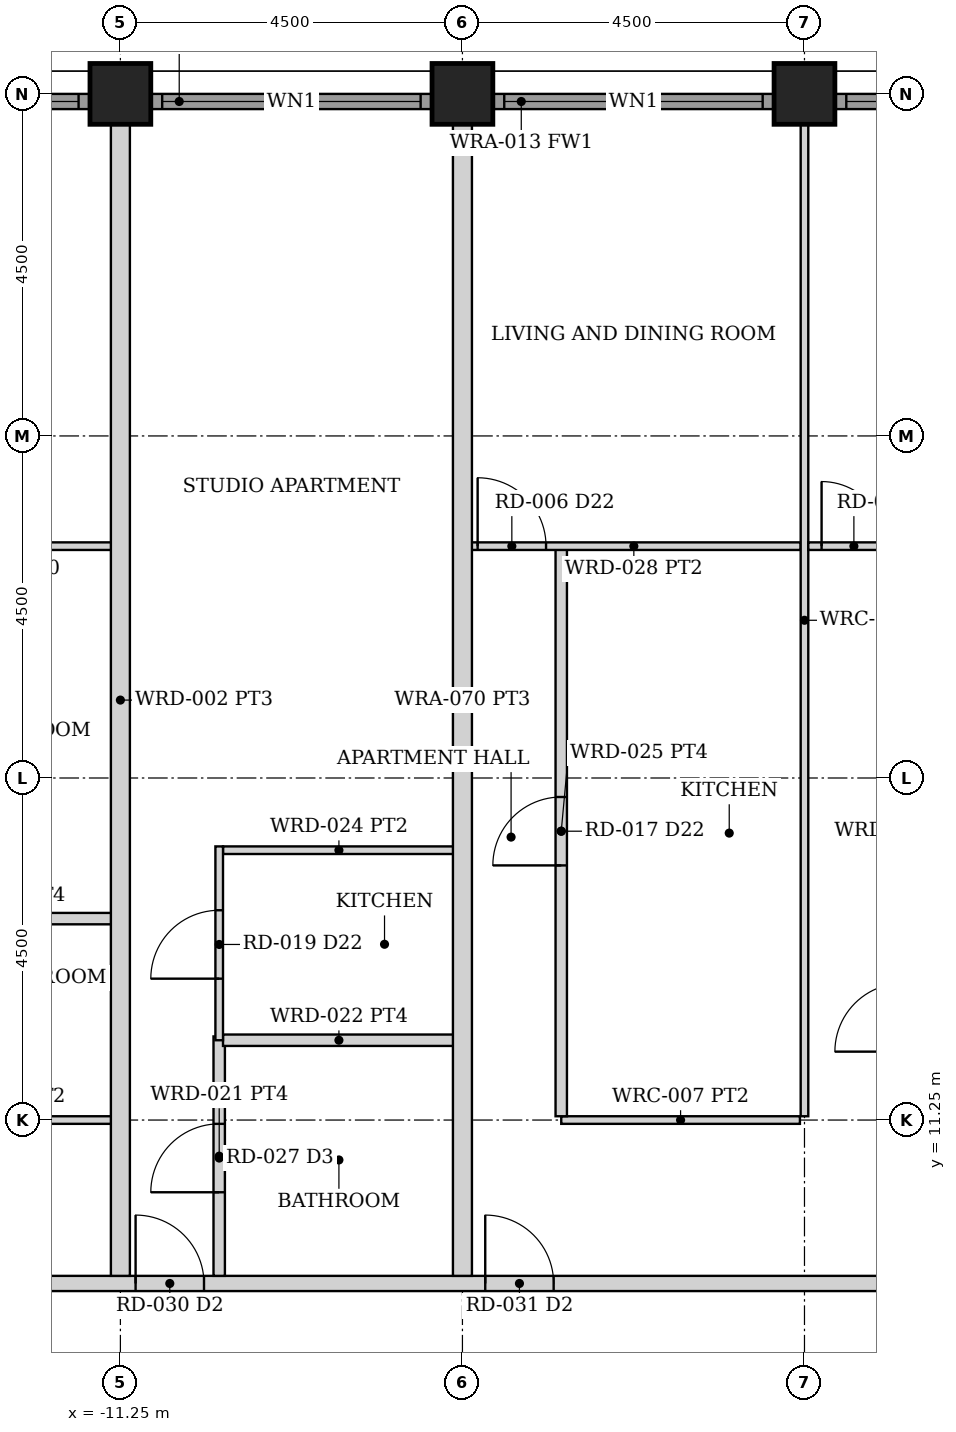
"""IFC4 building model, lengths in metres.
Left out: names, types, materials, properties, quantities, classifications, styles, units other than length and angle.
Written with IfcOpenShell. Run it as: python <this file> out.ifc"""

import sys

from ifc_helpers import new_model, si_unit, direction, frame, frame_2d, origin, origin_2d, place, context, subcontext, project, spatial, rectangle, hollow_rectangle, extrude, element, fill, save


model = new_model("IFC4")
c1 = context("Model", 3, precision=1e-05, world=origin(), true_north=direction((0.0, 1.0)))
c2 = subcontext(c1, "Body", "Model", "MODEL_VIEW")
j1 = project(units=[si_unit("LENGTHUNIT", "METRE"), si_unit("PLANEANGLEUNIT", "RADIAN")], contexts=[c1])
p1 = place(None, origin())
s1 = spatial("IfcSite", under=j1, at=p1, CompositionType="ELEMENT")
p2 = place(p1, origin())
s2 = spatial("IfcBuilding", under=s1, at=p2, CompositionType="ELEMENT")
p3 = place(p2, frame((0.0, 0.0, 58.0)))
s3 = spatial("IfcBuildingStorey", under=s2, at=p3, CompositionType="ELEMENT", Elevation=58.0)
for number, where, z_axis, x_axis in (
    (1, (-11.25, 24.75, 0.0), (0.0, 0.0, 1.0), (0.0, 1.0, 0.0)),
    (2, (-6.75, 24.75, 0.0), (0.0, 0.0, 1.0), (0.0, 1.0, 0.0)),
    (3, (-2.25, 24.75, 0.0), (0.0, 0.0, 1.0), (0.0, 1.0, 0.0)),
):
    element("IfcColumn", number, at=place(p3, frame(where, z_axis=z_axis, x_axis=x_axis)), inside=s3, PredefinedType="COLUMN", context=c2, shape_type="SweptSolid", body=[
        extrude(hollow_rectangle(XDim=0.8, YDim=0.8, WallThickness=0.06, at=origin_2d()), origin(), (0.0, 0.0, 1.0), 3.5),
    ])
p4 = place(p3, frame((-15.345, 24.65, 0.0), z_axis=(0.0, 0.0, 1.0), x_axis=(1.0, 0.0, 0.0)))
e4 = element("IfcWall", 4, at=p4, inside=s3, PredefinedType="SOLIDWALL", context=c2, shape_type="SweptSolid", body=[
    extrude(rectangle(XDim=3.69, YDim=0.2, at=frame_2d((1.845, 0.0))), origin(), (0.0, 0.0, 1.0), 2.379),
])
p5 = place(p4, frame((0.145, 0.0, 0.3)))
e5 = element("IfcOpeningElement", 5, at=p5, cuts=e4, PredefinedType="OPENING", context=c2, shape_type="SweptSolid", body=[
    extrude(rectangle(XDim=3.4, YDim=1.929, at=frame_2d((1.7, 0.964))), frame((0.0, 0.11, 0.0), z_axis=(0.0, -1.0, 0.0), x_axis=(1.0, 0.0, 0.0)), (0.0, 0.0, 1.0), 0.22),
])
p6 = place(p3, frame((-10.845, 24.65, 0.0), z_axis=(0.0, 0.0, 1.0), x_axis=(1.0, 0.0, 0.0)))
e6 = element("IfcWall", 6, at=p6, inside=s3, PredefinedType="SOLIDWALL", context=c2, shape_type="SweptSolid", body=[
    extrude(rectangle(XDim=3.69, YDim=0.2, at=frame_2d((1.845, 0.0))), origin(), (0.0, 0.0, 1.0), 2.379),
])
p7 = place(p6, frame((0.145, 0.0, 0.3)))
e7 = element("IfcOpeningElement", 7, at=p7, cuts=e6, PredefinedType="OPENING", context=c2, shape_type="SweptSolid", body=[
    extrude(rectangle(XDim=3.4, YDim=1.929, at=frame_2d((1.7, 0.964))), frame((0.0, 0.11, 0.0), z_axis=(0.0, -1.0, 0.0), x_axis=(1.0, 0.0, 0.0)), (0.0, 0.0, 1.0), 0.22),
])
p8 = place(p3, frame((-6.345, 24.65, 0.0), z_axis=(0.0, 0.0, 1.0), x_axis=(1.0, 0.0, 0.0)))
e8 = element("IfcWall", 8, at=p8, inside=s3, PredefinedType="SOLIDWALL", context=c2, shape_type="SweptSolid", body=[
    extrude(rectangle(XDim=3.69, YDim=0.2, at=frame_2d((1.845, 0.0))), origin(), (0.0, 0.0, 1.0), 2.379),
])
p9 = place(p8, frame((0.145, 0.0, 0.3)))
e9 = element("IfcOpeningElement", 9, at=p9, cuts=e8, PredefinedType="OPENING", context=c2, shape_type="SweptSolid", body=[
    extrude(rectangle(XDim=3.4, YDim=1.929, at=frame_2d((1.7, 0.964))), frame((0.0, 0.11, 0.0), z_axis=(0.0, -1.0, 0.0), x_axis=(1.0, 0.0, 0.0)), (0.0, 0.0, 1.0), 0.22),
])
p10 = place(p3, frame((-1.845, 24.65, 0.0), z_axis=(0.0, 0.0, 1.0), x_axis=(1.0, 0.0, 0.0)))
e10 = element("IfcWall", 10, at=p10, inside=s3, PredefinedType="SOLIDWALL", context=c2, shape_type="SweptSolid", body=[
    extrude(rectangle(XDim=3.69, YDim=0.2, at=frame_2d((1.845, 0.0))), origin(), (0.0, 0.0, 1.0), 2.379),
])
p11 = place(p10, frame((0.145, 0.0, 0.3)))
e11 = element("IfcOpeningElement", 11, at=p11, cuts=e10, PredefinedType="OPENING", context=c2, shape_type="SweptSolid", body=[
    extrude(rectangle(XDim=3.4, YDim=1.929, at=frame_2d((1.7, 0.964))), frame((0.0, 0.11, 0.0), z_axis=(0.0, -1.0, 0.0), x_axis=(1.0, 0.0, 0.0)), (0.0, 0.0, 1.0), 0.22),
])
p12 = place(p3, frame((-24.55, 9.1, 0.0), z_axis=(0.0, 0.0, 1.0), x_axis=(1.0, 0.0, 0.0)))
e12 = element("IfcWall", 12, at=p12, inside=s3, PredefinedType="PARTITIONING", context=c2, shape_type="SweptSolid", body=[
    extrude(rectangle(XDim=49.1, YDim=0.2, at=frame_2d((24.55, 0.0))), origin(), (0.0, 0.0, 1.0), 2.373),
])
p13 = place(p12, frame((5.1, 0.0, 0.0)))
e13 = element("IfcOpeningElement", 13, at=p13, cuts=e12, PredefinedType="OPENING", context=c2, shape_type="SweptSolid", body=[
    extrude(rectangle(XDim=0.9, YDim=2.1, at=frame_2d((0.45, 1.05))), frame((0.0, 0.11, 0.0), z_axis=(0.0, -1.0, 0.0), x_axis=(1.0, 0.0, 0.0)), (0.0, 0.0, 1.0), 0.22),
])
p14 = place(p12, frame((13.5, 0.0, 0.0)))
e14 = element("IfcOpeningElement", 14, at=p14, cuts=e12, PredefinedType="OPENING", context=c2, shape_type="SweptSolid", body=[
    extrude(rectangle(XDim=0.9, YDim=2.1, at=frame_2d((0.45, 1.05))), frame((0.0, 0.11, 0.0), z_axis=(0.0, -1.0, 0.0), x_axis=(1.0, 0.0, 0.0)), (0.0, 0.0, 1.0), 0.22),
])
p15 = place(p12, frame((18.1, 0.0, 0.0)))
e15 = element("IfcOpeningElement", 15, at=p15, cuts=e12, PredefinedType="OPENING", context=c2, shape_type="SweptSolid", body=[
    extrude(rectangle(XDim=0.9, YDim=2.1, at=frame_2d((0.45, 1.05))), frame((0.0, 0.11, 0.0), z_axis=(0.0, -1.0, 0.0), x_axis=(1.0, 0.0, 0.0)), (0.0, 0.0, 1.0), 0.22),
])
p16 = place(p12, frame((31.5, 0.0, 0.0)))
e16 = element("IfcOpeningElement", 16, at=p16, cuts=e12, PredefinedType="OPENING", context=c2, shape_type="SweptSolid", body=[
    extrude(rectangle(XDim=0.9, YDim=2.1, at=frame_2d((0.45, 1.05))), frame((0.0, 0.11, 0.0), z_axis=(0.0, -1.0, 0.0), x_axis=(1.0, 0.0, 0.0)), (0.0, 0.0, 1.0), 0.22),
])
p17 = place(p12, frame((43.1, 0.0, 0.0)))
e17 = element("IfcOpeningElement", 17, at=p17, cuts=e12, PredefinedType="OPENING", context=c2, shape_type="SweptSolid", body=[
    extrude(rectangle(XDim=0.9, YDim=2.1, at=frame_2d((0.45, 1.05))), frame((0.0, 0.11, 0.0), z_axis=(0.0, -1.0, 0.0), x_axis=(1.0, 0.0, 0.0)), (0.0, 0.0, 1.0), 0.22),
])
p18 = place(p3, frame((-14.45, 11.25, 0.0), z_axis=(0.0, 0.0, 1.0), x_axis=(1.0, 0.0, 0.0)))
e18 = element("IfcWall", 18, at=p18, inside=s3, PredefinedType="PARTITIONING", context=c2, shape_type="SweptSolid", body=[
    extrude(rectangle(XDim=3.14, YDim=0.1, at=frame_2d((1.57, 0.0))), origin(), (0.0, 0.0, 1.0), 2.373),
])
p19 = place(p3, frame((-15.7, 18.8, 0.0), z_axis=(0.0, 0.0, 1.0), x_axis=(1.0, 0.0, 0.0)))
e19 = element("IfcWall", 19, at=p19, inside=s3, PredefinedType="PARTITIONING", context=c2, shape_type="SweptSolid", body=[
    extrude(rectangle(XDim=4.39, YDim=0.1, at=frame_2d((2.195, 0.0))), origin(), (0.0, 0.0, 1.0), 2.373),
])
p20 = place(p19, frame((0.175, 0.0, 0.0)))
e20 = element("IfcOpeningElement", 20, at=p20, cuts=e19, PredefinedType="OPENING", context=c2, shape_type="SweptSolid", body=[
    extrude(rectangle(XDim=0.85, YDim=2.1, at=frame_2d((0.425, 1.05))), frame((0.0, 0.06, 0.0), z_axis=(0.0, -1.0, 0.0), x_axis=(1.0, 0.0, 0.0)), (0.0, 0.0, 1.0), 0.12),
])
p21 = place(p19, frame((2.46, 0.0, 0.0)))
e21 = element("IfcOpeningElement", 21, at=p21, cuts=e19, PredefinedType="OPENING", context=c2, shape_type="SweptSolid", body=[
    extrude(rectangle(XDim=0.8, YDim=2.1, at=frame_2d((0.4, 1.05))), frame((0.0, 0.06, 0.0), z_axis=(0.0, -1.0, 0.0), x_axis=(1.0, 0.0, 0.0)), (0.0, 0.0, 1.0), 0.12),
])
p22 = place(p3, frame((-14.45, 13.9, 0.0), z_axis=(0.0, 0.0, 1.0), x_axis=(1.0, 0.0, 0.0)))
e22 = element("IfcWall", 22, at=p22, inside=s3, PredefinedType="PARTITIONING", context=c2, shape_type="SweptSolid", body=[
    extrude(rectangle(XDim=3.14, YDim=0.15, at=frame_2d((1.57, 0.0))), origin(), (0.0, 0.0, 1.0), 2.373),
])
p23 = place(p3, frame((-9.95, 9.2, 0.0), z_axis=(0.0, 0.0, 1.0), x_axis=(0.0, 1.0, 0.0)))
e23 = element("IfcWall", 23, at=p23, inside=s3, PredefinedType="PARTITIONING", context=c2, shape_type="SweptSolid", body=[
    extrude(rectangle(XDim=3.15, YDim=0.15, at=frame_2d((1.575, 0.0))), origin(), (0.0, 0.0, 1.0), 2.373),
])
p24 = place(p23, frame((1.1, 0.0, 0.0)))
e24 = element("IfcOpeningElement", 24, at=p24, cuts=e23, PredefinedType="OPENING", context=c2, shape_type="SweptSolid", body=[
    extrude(rectangle(XDim=0.9, YDim=2.1, at=frame_2d((0.45, 1.05))), frame((0.0, 0.085, 0.0), z_axis=(0.0, -1.0, 0.0), x_axis=(1.0, 0.0, 0.0)), (0.0, 0.0, 1.0), 0.17),
])
p25 = place(p3, frame((-9.9, 12.3, 0.0), z_axis=(0.0, 0.0, 1.0), x_axis=(1.0, 0.0, 0.0)))
e25 = element("IfcWall", 25, at=p25, inside=s3, PredefinedType="PARTITIONING", context=c2, shape_type="SweptSolid", body=[
    extrude(rectangle(XDim=3.05, YDim=0.15, at=frame_2d((1.525, 0.0))), origin(), (0.0, 0.0, 1.0), 2.373),
])
p26 = place(p3, frame((-9.9, 14.8, 0.0), z_axis=(0.0, 0.0, 1.0), x_axis=(1.0, 0.0, 0.0)))
e26 = element("IfcWall", 26, at=p26, inside=s3, PredefinedType="PARTITIONING", context=c2, shape_type="SweptSolid", body=[
    extrude(rectangle(XDim=3.05, YDim=0.1, at=frame_2d((1.525, 0.0))), origin(), (0.0, 0.0, 1.0), 2.373),
])
p27 = place(p3, frame((-9.95, 12.3, 0.0), z_axis=(0.0, 0.0, 1.0), x_axis=(0.0, 1.0, 0.0)))
e27 = element("IfcWall", 27, at=p27, inside=s3, PredefinedType="PARTITIONING", context=c2, shape_type="SweptSolid", body=[
    extrude(rectangle(XDim=2.55, YDim=0.1, at=frame_2d((1.275, 0.0))), origin(), (0.0, 0.0, 1.0), 2.373),
])
p28 = place(p27, frame((0.81, 0.0, 0.0)))
e28 = element("IfcOpeningElement", 28, at=p28, cuts=e27, PredefinedType="OPENING", context=c2, shape_type="SweptSolid", body=[
    extrude(rectangle(XDim=0.9, YDim=2.1, at=frame_2d((0.45, 1.05))), frame((0.0, 0.06, 0.0), z_axis=(0.0, -1.0, 0.0), x_axis=(1.0, 0.0, 0.0)), (0.0, 0.0, 1.0), 0.12),
])
p29 = place(p3, frame((-5.45, 11.25, 0.0), z_axis=(0.0, 0.0, 1.0), x_axis=(1.0, 0.0, 0.0)))
e29 = element("IfcWall", 29, at=p29, inside=s3, PredefinedType="PARTITIONING", context=c2, shape_type="SweptSolid", body=[
    extrude(rectangle(XDim=3.14, YDim=0.1, at=frame_2d((1.57, 0.0))), origin(), (0.0, 0.0, 1.0), 2.373),
])
p30 = place(p3, frame((-5.45, 11.3, 0.0), z_axis=(0.0, 0.0, 1.0), x_axis=(0.0, 1.0, 0.0)))
e30 = element("IfcWall", 30, at=p30, inside=s3, PredefinedType="PARTITIONING", context=c2, shape_type="SweptSolid", body=[
    extrude(rectangle(XDim=7.5, YDim=0.15, at=frame_2d((3.75, 0.0))), origin(), (0.0, 0.0, 1.0), 2.373),
])
p31 = place(p30, frame((3.3, 0.0, 0.0)))
e31 = element("IfcOpeningElement", 31, at=p31, cuts=e30, PredefinedType="OPENING", context=c2, shape_type="SweptSolid", body=[
    extrude(rectangle(XDim=0.9, YDim=2.1, at=frame_2d((0.45, 1.05))), frame((0.0, 0.085, 0.0), z_axis=(0.0, -1.0, 0.0), x_axis=(1.0, 0.0, 0.0)), (0.0, 0.0, 1.0), 0.17),
])
p32 = place(p3, frame((-6.69, 18.8, 0.0), z_axis=(0.0, 0.0, 1.0), x_axis=(1.0, 0.0, 0.0)))
e32 = element("IfcWall", 32, at=p32, inside=s3, PredefinedType="PARTITIONING", context=c2, shape_type="SweptSolid", body=[
    extrude(rectangle(XDim=4.39, YDim=0.1, at=frame_2d((2.195, 0.0))), origin(), (0.0, 0.0, 1.0), 2.373),
])
p33 = place(p32, frame((0.14, 0.0, 0.0)))
e33 = element("IfcOpeningElement", 33, at=p33, cuts=e32, PredefinedType="OPENING", context=c2, shape_type="SweptSolid", body=[
    extrude(rectangle(XDim=0.9, YDim=2.1, at=frame_2d((0.45, 1.05))), frame((0.0, 0.06, 0.0), z_axis=(0.0, -1.0, 0.0), x_axis=(1.0, 0.0, 0.0)), (0.0, 0.0, 1.0), 0.12),
])
p34 = place(p3, frame((-2.25, 11.3, 0.0), z_axis=(0.0, 0.0, 1.0), x_axis=(0.0, 1.0, 0.0)))
e34 = element("IfcWall", 34, at=p34, inside=s3, PredefinedType="PARTITIONING", context=c2, shape_type="SweptSolid", body=[
    extrude(rectangle(XDim=13.05, YDim=0.1, at=frame_2d((6.525, 0.0))), origin(), (0.0, 0.0, 1.0), 2.373),
])
p35 = place(p3, frame((-2.2, 18.8, 0.0), z_axis=(0.0, 0.0, 1.0), x_axis=(1.0, 0.0, 0.0)))
e35 = element("IfcWall", 35, at=p35, inside=s3, PredefinedType="PARTITIONING", context=c2, shape_type="SweptSolid", body=[
    extrude(rectangle(XDim=4.4, YDim=0.1, at=frame_2d((2.2, 0.0))), origin(), (0.0, 0.0, 1.0), 2.373),
])
p36 = place(p35, frame((0.175, 0.0, 0.0)))
e36 = element("IfcOpeningElement", 36, at=p36, cuts=e35, PredefinedType="OPENING", context=c2, shape_type="SweptSolid", body=[
    extrude(rectangle(XDim=0.85, YDim=2.1, at=frame_2d((0.425, 1.05))), frame((0.0, 0.06, 0.0), z_axis=(0.0, -1.0, 0.0), x_axis=(1.0, 0.0, 0.0)), (0.0, 0.0, 1.0), 0.12),
])
p37 = place(p35, frame((2.46, 0.0, 0.0)))
e37 = element("IfcOpeningElement", 37, at=p37, cuts=e35, PredefinedType="OPENING", context=c2, shape_type="SweptSolid", body=[
    extrude(rectangle(XDim=0.8, YDim=2.1, at=frame_2d((0.4, 1.05))), frame((0.0, 0.06, 0.0), z_axis=(0.0, -1.0, 0.0), x_axis=(1.0, 0.0, 0.0)), (0.0, 0.0, 1.0), 0.12),
])
for number, where, z_axis, x_axis in (
    (38, (-11.25, 9.2, 0.0), (0.0, 0.0, 1.0), (0.0, 1.0, 0.0)),
    (39, (-6.75, 9.2, 0.0), (0.0, 0.0, 1.0), (0.0, 1.0, 0.0)),
):
    element("IfcWall", number, at=place(p3, frame(where, z_axis=z_axis, x_axis=x_axis)), inside=s3, PredefinedType="PARTITIONING", context=c2, shape_type="SweptSolid", body=[
        extrude(rectangle(XDim=15.15, YDim=0.25, at=frame_2d((7.575, 0.0))), origin(), (0.0, 0.0, 1.0), 2.373),
    ])
p38 = place(p5, origin())
e40 = element("IfcWindow", 40, at=p38, inside=s3, PartitioningType="SINGLE_PANEL", PredefinedType="WINDOW", context=c2, shape_type="SweptSolid", body=[
    extrude(rectangle(XDim=3.4, YDim=1.929, at=frame_2d((1.7, 0.964))), frame((0.0, 0.03, 0.0), z_axis=(0.0, -1.0, 0.0), x_axis=(1.0, 0.0, 0.0)), (0.0, 0.0, 1.0), 0.06),
])
fill(e5, e40)
p39 = place(p7, origin())
e41 = element("IfcWindow", 41, at=p39, inside=s3, PartitioningType="SINGLE_PANEL", PredefinedType="WINDOW", context=c2, shape_type="SweptSolid", body=[
    extrude(rectangle(XDim=3.4, YDim=1.929, at=frame_2d((1.7, 0.964))), frame((0.0, 0.03, 0.0), z_axis=(0.0, -1.0, 0.0), x_axis=(1.0, 0.0, 0.0)), (0.0, 0.0, 1.0), 0.06),
])
fill(e7, e41)
p40 = place(p9, origin())
e42 = element("IfcWindow", 42, at=p40, inside=s3, PartitioningType="SINGLE_PANEL", PredefinedType="WINDOW", context=c2, shape_type="SweptSolid", body=[
    extrude(rectangle(XDim=3.4, YDim=1.929, at=frame_2d((1.7, 0.964))), frame((0.0, 0.03, 0.0), z_axis=(0.0, -1.0, 0.0), x_axis=(1.0, 0.0, 0.0)), (0.0, 0.0, 1.0), 0.06),
])
fill(e9, e42)
p41 = place(p11, origin())
e43 = element("IfcWindow", 43, at=p41, inside=s3, PartitioningType="SINGLE_PANEL", PredefinedType="WINDOW", context=c2, shape_type="SweptSolid", body=[
    extrude(rectangle(XDim=3.4, YDim=1.929, at=frame_2d((1.7, 0.964))), frame((0.0, 0.03, 0.0), z_axis=(0.0, -1.0, 0.0), x_axis=(1.0, 0.0, 0.0)), (0.0, 0.0, 1.0), 0.06),
])
fill(e11, e43)
p42 = place(p14, origin())
e44 = element("IfcDoor", 44, at=p42, inside=s3, OperationType="SINGLE_SWING_LEFT", PredefinedType="DOOR", context=c2, shape_type="SweptSolid", body=[
    extrude(rectangle(XDim=0.9, YDim=2.1, at=frame_2d((0.45, 1.05))), frame((0.0, 0.025, 0.0), z_axis=(0.0, -1.0, 0.0), x_axis=(1.0, 0.0, 0.0)), (0.0, 0.0, 1.0), 0.05),
])
fill(e14, e44)
p43 = place(p24, origin())
e45 = element("IfcDoor", 45, at=p43, inside=s3, OperationType="SINGLE_SWING_LEFT", PredefinedType="DOOR", context=c2, shape_type="SweptSolid", body=[
    extrude(rectangle(XDim=0.9, YDim=2.1, at=frame_2d((0.45, 1.05))), frame((0.0, 0.025, 0.0), z_axis=(0.0, -1.0, 0.0), x_axis=(1.0, 0.0, 0.0)), (0.0, 0.0, 1.0), 0.05),
])
fill(e24, e45)
p44 = place(p28, origin())
e46 = element("IfcDoor", 46, at=p44, inside=s3, OperationType="SINGLE_SWING_LEFT", PredefinedType="DOOR", context=c2, shape_type="SweptSolid", body=[
    extrude(rectangle(XDim=0.9, YDim=2.1, at=frame_2d((0.45, 1.05))), frame((0.0, 0.025, 0.0), z_axis=(0.0, -1.0, 0.0), x_axis=(1.0, 0.0, 0.0)), (0.0, 0.0, 1.0), 0.05),
])
fill(e28, e46)
p45 = place(p15, origin())
e47 = element("IfcDoor", 47, at=p45, inside=s3, OperationType="SINGLE_SWING_LEFT", PredefinedType="DOOR", context=c2, shape_type="SweptSolid", body=[
    extrude(rectangle(XDim=0.9, YDim=2.1, at=frame_2d((0.45, 1.05))), frame((0.0, 0.025, 0.0), z_axis=(0.0, -1.0, 0.0), x_axis=(1.0, 0.0, 0.0)), (0.0, 0.0, 1.0), 0.05),
])
fill(e15, e47)
p46 = place(p31, origin())
e48 = element("IfcDoor", 48, at=p46, inside=s3, OperationType="SINGLE_SWING_LEFT", PredefinedType="DOOR", context=c2, shape_type="SweptSolid", body=[
    extrude(rectangle(XDim=0.9, YDim=2.1, at=frame_2d((0.45, 1.05))), frame((0.0, 0.025, 0.0), z_axis=(0.0, -1.0, 0.0), x_axis=(1.0, 0.0, 0.0)), (0.0, 0.0, 1.0), 0.05),
])
fill(e31, e48)
p47 = place(p33, origin())
e49 = element("IfcDoor", 49, at=p47, inside=s3, OperationType="SINGLE_SWING_LEFT", PredefinedType="DOOR", context=c2, shape_type="SweptSolid", body=[
    extrude(rectangle(XDim=0.9, YDim=2.1, at=frame_2d((0.45, 1.05))), frame((0.0, 0.025, 0.0), z_axis=(0.0, -1.0, 0.0), x_axis=(1.0, 0.0, 0.0)), (0.0, 0.0, 1.0), 0.05),
])
fill(e33, e49)
p48 = place(p36, origin())
e50 = element("IfcDoor", 50, at=p48, inside=s3, OperationType="SINGLE_SWING_LEFT", PredefinedType="DOOR", context=c2, shape_type="SweptSolid", body=[
    extrude(rectangle(XDim=0.85, YDim=2.1, at=frame_2d((0.425, 1.05))), frame((0.0, 0.025, 0.0), z_axis=(0.0, -1.0, 0.0), x_axis=(1.0, 0.0, 0.0)), (0.0, 0.0, 1.0), 0.05),
])
fill(e36, e50)
save(model, sys.argv[1])
